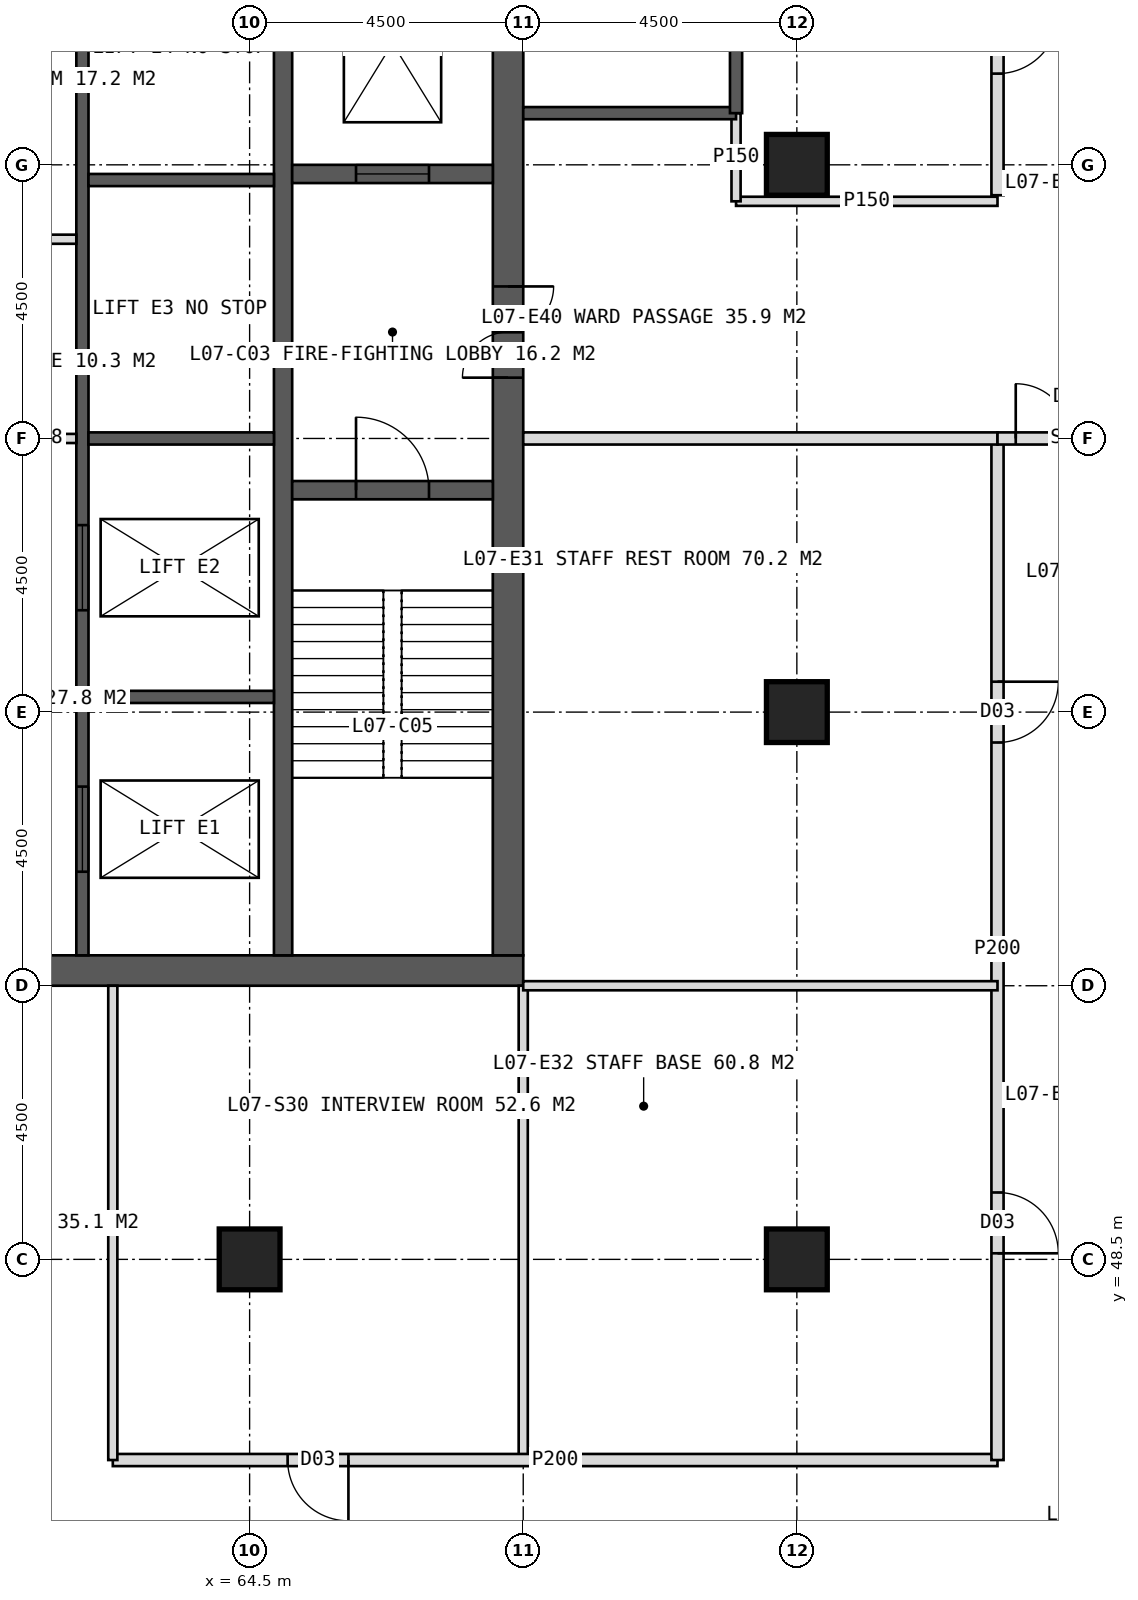
"""IFC4 building model, lengths in metres.
Left out: names, types, materials, properties, quantities, classifications, styles, units other than length and angle.
Written with IfcOpenShell. Run it as: python <this file> out.ifc"""

import sys

from ifc_helpers import new_model, si_unit, direction, frame, frame_2d, origin, origin_2d, place, context, subcontext, project, spatial, rectangle, hollow_rectangle, extrude, element, fill, save


model = new_model("IFC4")
c1 = context("Model", 3, precision=1e-05, world=origin(), true_north=direction((0.0, 1.0)))
c2 = subcontext(c1, "Body", "Model", "MODEL_VIEW")
j1 = project(units=[si_unit("LENGTHUNIT", "METRE"), si_unit("PLANEANGLEUNIT", "RADIAN")], contexts=[c1])
p1 = place(None, origin())
s1 = spatial("IfcSite", under=j1, at=p1, CompositionType="ELEMENT")
p2 = place(p1, origin())
s2 = spatial("IfcBuilding", under=s1, at=p2, CompositionType="ELEMENT")
p3 = place(p2, frame((0.0, 0.0, 35.0)))
s3 = spatial("IfcBuildingStorey", under=s2, at=p3, CompositionType="ELEMENT", Elevation=35.0)
p4 = place(p3, frame((51.0, 53.25, 0.0), z_axis=(0.0, 0.0, 1.0), x_axis=(1.0, 0.0, 0.0)))
e1 = element("IfcWall", 1, at=p4, inside=s3, PredefinedType="SHEAR", context=c2, shape_type="SweptSolid", body=[
    extrude(rectangle(XDim=18.0, YDim=0.5, at=frame_2d((9.0, 0.0))), origin(), (0.0, 0.0, 1.0), 4.0),
])
p5 = place(p4, frame((8.1, 0.0, 0.0)))
e2 = element("IfcOpeningElement", 2, at=p5, cuts=e1, PredefinedType="OPENING", context=c2, shape_type="SweptSolid", body=[
    extrude(rectangle(XDim=1.8, YDim=2.2, at=frame_2d((0.9, 1.1))), frame((0.0, 0.26, 0.0), z_axis=(0.0, -1.0, 0.0), x_axis=(1.0, 0.0, 0.0)), (0.0, 0.0, 1.0), 0.52),
])
p6 = place(p3, frame((68.75, 53.5, 0.0), z_axis=(0.0, 0.0, 1.0), x_axis=(0.0, 1.0, 0.0)))
e3 = element("IfcWall", 3, at=p6, inside=s3, PredefinedType="SHEAR", context=c2, shape_type="SweptSolid", body=[
    extrude(rectangle(XDim=17.0, YDim=0.5, at=frame_2d((8.5, 0.0))), origin(), (0.0, 0.0, 1.0), 4.0),
])
p7 = place(p6, frame((9.5, 0.0, 0.0)))
e4 = element("IfcOpeningElement", 4, at=p7, cuts=e3, PredefinedType="OPENING", context=c2, shape_type="SweptSolid", body=[
    extrude(rectangle(XDim=1.5, YDim=2.2, at=frame_2d((0.75, 1.1))), frame((0.0, 0.26, 0.0), z_axis=(0.0, -1.0, 0.0), x_axis=(1.0, 0.0, 0.0)), (0.0, 0.0, 1.0), 0.52),
])
p8 = place(p3, frame((65.05, 53.5, 0.0), z_axis=(0.0, 0.0, 1.0), x_axis=(0.0, 1.0, 0.0)))
e5 = element("IfcWall", 5, at=p8, inside=s3, PredefinedType="SHEAR", context=c2, shape_type="SweptSolid", body=[
    extrude(rectangle(XDim=17.0, YDim=0.3, at=frame_2d((8.5, 0.0))), origin(), (0.0, 0.0, 1.0), 4.0),
])
p9 = place(p3, frame((61.75, 53.5, 0.0), z_axis=(0.0, 0.0, 1.0), x_axis=(0.0, 1.0, 0.0)))
e6 = element("IfcWall", 6, at=p9, inside=s3, PredefinedType="SHEAR", context=c2, shape_type="SweptSolid", body=[
    extrude(rectangle(XDim=17.0, YDim=0.2, at=frame_2d((8.5, 0.0))), origin(), (0.0, 0.0, 1.0), 4.0),
])
p10 = place(p9, frame((1.375, 0.0, 0.0)))
e7 = element("IfcOpeningElement", 7, at=p10, cuts=e6, PredefinedType="OPENING", context=c2, shape_type="SweptSolid", body=[
    extrude(rectangle(XDim=1.4, YDim=2.2, at=frame_2d((0.7, 1.1))), frame((0.0, 0.11, 0.0), z_axis=(0.0, -1.0, 0.0), x_axis=(1.0, 0.0, 0.0)), (0.0, 0.0, 1.0), 0.22),
])
p11 = place(p9, frame((5.675, 0.0, 0.0)))
e8 = element("IfcOpeningElement", 8, at=p11, cuts=e6, PredefinedType="OPENING", context=c2, shape_type="SweptSolid", body=[
    extrude(rectangle(XDim=1.4, YDim=2.2, at=frame_2d((0.7, 1.1))), frame((0.0, 0.11, 0.0), z_axis=(0.0, -1.0, 0.0), x_axis=(1.0, 0.0, 0.0)), (0.0, 0.0, 1.0), 0.22),
])
for number, where, z_axis, x_axis in (
    (9, (61.85, 57.75, 0.0), (0.0, 0.0, 1.0), (1.0, 0.0, 0.0)),
    (10, (61.85, 62.0, 0.0), (0.0, 0.0, 1.0), (1.0, 0.0, 0.0)),
    (11, (61.85, 66.25, 0.0), (0.0, 0.0, 1.0), (1.0, 0.0, 0.0)),
):
    element("IfcWall", number, at=place(p3, frame(where, z_axis=z_axis, x_axis=x_axis)), inside=s3, PredefinedType="SHEAR", context=c2, shape_type="SweptSolid", body=[
        extrude(rectangle(XDim=3.05, YDim=0.2, at=frame_2d((1.525, 0.0))), origin(), (0.0, 0.0, 1.0), 4.0),
    ])
p12 = place(p3, frame((65.2, 61.15, 0.0), z_axis=(0.0, 0.0, 1.0), x_axis=(1.0, 0.0, 0.0)))
e12 = element("IfcWall", 12, at=p12, inside=s3, PredefinedType="SHEAR", context=c2, shape_type="SweptSolid", body=[
    extrude(rectangle(XDim=3.3, YDim=0.3, at=frame_2d((1.65, 0.0))), origin(), (0.0, 0.0, 1.0), 4.0),
])
p13 = place(p12, frame((1.05, 0.0, 0.0)))
e13 = element("IfcOpeningElement", 13, at=p13, cuts=e12, PredefinedType="OPENING", context=c2, shape_type="SweptSolid", body=[
    extrude(rectangle(XDim=1.2, YDim=2.1, at=frame_2d((0.6, 1.05))), frame((0.0, 0.16, 0.0), z_axis=(0.0, -1.0, 0.0), x_axis=(1.0, 0.0, 0.0)), (0.0, 0.0, 1.0), 0.32),
])
p14 = place(p3, frame((65.2, 66.35, 0.0), z_axis=(0.0, 0.0, 1.0), x_axis=(1.0, 0.0, 0.0)))
e14 = element("IfcWall", 14, at=p14, inside=s3, PredefinedType="SHEAR", context=c2, shape_type="SweptSolid", body=[
    extrude(rectangle(XDim=3.3, YDim=0.3, at=frame_2d((1.65, 0.0))), origin(), (0.0, 0.0, 1.0), 4.0),
])
p15 = place(p14, frame((1.05, 0.0, 0.0)))
e15 = element("IfcOpeningElement", 15, at=p15, cuts=e14, PredefinedType="OPENING", context=c2, shape_type="SweptSolid", body=[
    extrude(rectangle(XDim=1.2, YDim=2.2, at=frame_2d((0.6, 1.1))), frame((0.0, 0.16, 0.0), z_axis=(0.0, -1.0, 0.0), x_axis=(1.0, 0.0, 0.0)), (0.0, 0.0, 1.0), 0.32),
])
for number, where, z_axis, x_axis in (
    (16, (73.5, 48.5, 0.0), (0.0, 0.0, 1.0), (1.0, 0.0, 0.0)),
    (17, (64.5, 48.5, 0.0), (0.0, 0.0, 1.0), (1.0, 0.0, 0.0)),
    (18, (73.5, 57.5, 0.0), (0.0, 0.0, 1.0), (1.0, 0.0, 0.0)),
    (19, (73.5, 66.5, 0.0), (0.0, 0.0, 1.0), (1.0, 0.0, 0.0)),
):
    element("IfcColumn", number, at=place(p3, frame(where, z_axis=z_axis, x_axis=x_axis)), inside=s3, PredefinedType="COLUMN", context=c2, shape_type="SweptSolid", body=[
        extrude(hollow_rectangle(XDim=1.0, YDim=1.0, WallThickness=0.1, at=origin_2d()), origin(), (0.0, 0.0, 1.0), 4.0),
    ])
p16 = place(p3, frame((69.0, 53.0, 0.0), z_axis=(0.0, 0.0, 1.0), x_axis=(0.0, -1.0, 0.0)))
e20 = element("IfcWall", 20, at=p16, inside=s3, PredefinedType="PARTITIONING", context=c2, shape_type="SweptSolid", body=[
    extrude(rectangle(XDim=7.8, YDim=0.15, at=frame_2d((3.9, 0.0))), origin(), (0.0, 0.0, 1.0), 3.75),
])
p17 = place(p3, frame((76.8, 45.2, 0.0), z_axis=(0.0, 0.0, 1.0), x_axis=(-1.0, 0.0, 0.0)))
e21 = element("IfcWall", 21, at=p17, inside=s3, PredefinedType="PARTITIONING", context=c2, shape_type="SweptSolid", body=[
    extrude(rectangle(XDim=14.55, YDim=0.2, at=frame_2d((7.275, 0.0))), origin(), (0.0, 0.0, 1.0), 3.75),
])
p18 = place(p17, frame((10.675, 0.0, 0.0)))
e22 = element("IfcOpeningElement", 22, at=p18, cuts=e21, PredefinedType="OPENING", context=c2, shape_type="SweptSolid", body=[
    extrude(rectangle(XDim=1.0, YDim=2.1, at=frame_2d((0.5, 1.05))), frame((0.0, 0.11, 0.0), z_axis=(0.0, -1.0, 0.0), x_axis=(1.0, 0.0, 0.0)), (0.0, 0.0, 1.0), 0.22),
])
p19 = place(p3, frame((62.25, 53.0, 0.0), z_axis=(0.0, 0.0, 1.0), x_axis=(0.0, -1.0, 0.0)))
e23 = element("IfcWall", 23, at=p19, inside=s3, PredefinedType="PARTITIONING", context=c2, shape_type="SweptSolid", body=[
    extrude(rectangle(XDim=7.8, YDim=0.15, at=frame_2d((3.9, 0.0))), origin(), (0.0, 0.0, 1.0), 3.75),
])
p20 = place(p3, frame((76.8, 78.8, 0.0), z_axis=(0.0, 0.0, 1.0), x_axis=(0.0, -1.0, 0.0)))
e24 = element("IfcWall", 24, at=p20, inside=s3, PredefinedType="PARTITIONING", context=c2, shape_type="SweptSolid", body=[
    extrude(rectangle(XDim=12.8, YDim=0.2, at=frame_2d((6.4, 0.0))), origin(), (0.0, 0.0, 1.0), 3.75),
])
p21 = place(p20, frame((9.8, 0.0, 0.0)))
e25 = element("IfcOpeningElement", 25, at=p21, cuts=e24, PredefinedType="OPENING", context=c2, shape_type="SweptSolid", body=[
    extrude(rectangle(XDim=1.0, YDim=2.1, at=frame_2d((0.5, 1.05))), frame((0.0, 0.11, 0.0), z_axis=(0.0, -1.0, 0.0), x_axis=(1.0, 0.0, 0.0)), (0.0, 0.0, 1.0), 0.22),
])
p22 = place(p3, frame((76.8, 62.0, 0.0), z_axis=(0.0, 0.0, 1.0), x_axis=(0.0, -1.0, 0.0)))
e26 = element("IfcWall", 26, at=p22, inside=s3, PredefinedType="PARTITIONING", context=c2, shape_type="SweptSolid", body=[
    extrude(rectangle(XDim=16.8, YDim=0.2, at=frame_2d((8.4, 0.0))), origin(), (0.0, 0.0, 1.0), 3.75),
])
p23 = place(p22, frame((4.0, 0.0, 0.0)))
e27 = element("IfcOpeningElement", 27, at=p23, cuts=e26, PredefinedType="OPENING", context=c2, shape_type="SweptSolid", body=[
    extrude(rectangle(XDim=1.0, YDim=2.1, at=frame_2d((0.5, 1.05))), frame((0.0, 0.11, 0.0), z_axis=(0.0, -1.0, 0.0), x_axis=(1.0, 0.0, 0.0)), (0.0, 0.0, 1.0), 0.22),
])
p24 = place(p22, frame((12.4, 0.0, 0.0)))
e28 = element("IfcOpeningElement", 28, at=p24, cuts=e26, PredefinedType="OPENING", context=c2, shape_type="SweptSolid", body=[
    extrude(rectangle(XDim=1.0, YDim=2.1, at=frame_2d((0.5, 1.05))), frame((0.0, 0.11, 0.0), z_axis=(0.0, -1.0, 0.0), x_axis=(1.0, 0.0, 0.0)), (0.0, 0.0, 1.0), 0.22),
])
p25 = place(p3, frame((72.5, 65.9, 0.0), z_axis=(0.0, 0.0, 1.0), x_axis=(1.0, 0.0, 0.0)))
e29 = element("IfcWall", 29, at=p25, inside=s3, PredefinedType="PARTITIONING", context=c2, shape_type="SweptSolid", body=[
    extrude(rectangle(XDim=4.3, YDim=0.15, at=frame_2d((2.15, 0.0))), origin(), (0.0, 0.0, 1.0), 3.75),
])
p26 = place(p3, frame((69.0, 62.0, 0.0), z_axis=(0.0, 0.0, 1.0), x_axis=(1.0, 0.0, 0.0)))
e30 = element("IfcWall", 30, at=p26, inside=s3, PredefinedType="SOLIDWALL", context=c2, shape_type="SweptSolid", body=[
    extrude(rectangle(XDim=7.8, YDim=0.2, at=frame_2d((3.9, 0.0))), origin(), (0.0, 0.0, 1.0), 2.75),
])
p27 = place(p3, frame((69.0, 53.0, 0.0), z_axis=(0.0, 0.0, 1.0), x_axis=(1.0, 0.0, 0.0)))
e31 = element("IfcWall", 31, at=p27, inside=s3, PredefinedType="PARTITIONING", context=c2, shape_type="SweptSolid", body=[
    extrude(rectangle(XDim=7.8, YDim=0.15, at=frame_2d((3.9, 0.0))), origin(), (0.0, 0.0, 1.0), 3.75),
])
p28 = place(p3, frame((76.8, 62.0, 0.0), z_axis=(0.0, 0.0, 1.0), x_axis=(1.0, 0.0, 0.0)))
e32 = element("IfcWall", 32, at=p28, inside=s3, PredefinedType="SOLIDWALL", context=c2, shape_type="SweptSolid", body=[
    extrude(rectangle(XDim=2.7, YDim=0.2, at=frame_2d((1.35, 0.0))), origin(), (0.0, 0.0, 1.0), 2.75),
])
p29 = place(p28, frame((0.3, 0.0, 0.0)))
e33 = element("IfcOpeningElement", 33, at=p29, cuts=e32, PredefinedType="OPENING", context=c2, shape_type="SweptSolid", body=[
    extrude(rectangle(XDim=1.8, YDim=2.2, at=frame_2d((0.9, 1.1))), frame((0.0, 0.11, 0.0), z_axis=(0.0, -1.0, 0.0), x_axis=(1.0, 0.0, 0.0)), (0.0, 0.0, 1.0), 0.22),
])
p30 = place(p3, frame((58.35, 62.0, 0.0), z_axis=(0.0, 0.0, 1.0), x_axis=(1.0, 0.0, 0.0)))
e34 = element("IfcWall", 34, at=p30, inside=s3, PredefinedType="PARTITIONING", context=c2, shape_type="SweptSolid", body=[
    extrude(rectangle(XDim=3.3, YDim=0.15, at=frame_2d((1.65, 0.0))), origin(), (0.0, 0.0, 1.0), 3.75),
])
p31 = place(p30, frame((1.15, 0.0, 0.0)))
e35 = element("IfcOpeningElement", 35, at=p31, cuts=e34, PredefinedType="OPENING", context=c2, shape_type="SweptSolid", body=[
    extrude(rectangle(XDim=1.0, YDim=2.1, at=frame_2d((0.5, 1.05))), frame((0.0, 0.085, 0.0), z_axis=(0.0, -1.0, 0.0), x_axis=(1.0, 0.0, 0.0)), (0.0, 0.0, 1.0), 0.17),
])
p32 = place(p3, frame((58.35, 65.277, 0.0), z_axis=(0.0, 0.0, 1.0), x_axis=(1.0, 0.0, 0.0)))
e36 = element("IfcWall", 36, at=p32, inside=s3, PredefinedType="PARTITIONING", context=c2, shape_type="SweptSolid", body=[
    extrude(rectangle(XDim=3.3, YDim=0.15, at=frame_2d((1.65, 0.0))), origin(), (0.0, 0.0, 1.0), 3.75),
])
p33 = place(p3, frame((72.5, 65.9, 0.0), z_axis=(0.0, 0.0, 1.0), x_axis=(0.0, 1.0, 0.0)))
e37 = element("IfcWall", 37, at=p33, inside=s3, PredefinedType="PARTITIONING", context=c2, shape_type="SweptSolid", body=[
    extrude(rectangle(XDim=1.45, YDim=0.15, at=frame_2d((0.725, 0.0))), origin(), (0.0, 0.0, 1.0), 3.75),
])
p34 = place(p3, frame((69.0, 67.35, 0.0), z_axis=(0.0, 0.0, 1.0), x_axis=(1.0, 0.0, 0.0)))
e38 = element("IfcWall", 38, at=p34, inside=s3, PredefinedType="SOLIDWALL", context=c2, shape_type="SweptSolid", body=[
    extrude(rectangle(XDim=3.5, YDim=0.2, at=frame_2d((1.75, 0.0))), origin(), (0.0, 0.0, 1.0), 3.75),
])
p35 = place(p3, frame((72.5, 67.35, 0.0), z_axis=(0.0, 0.0, 1.0), x_axis=(0.0, 1.0, 0.0)))
e39 = element("IfcWall", 39, at=p35, inside=s3, PredefinedType="SOLIDWALL", context=c2, shape_type="SweptSolid", body=[
    extrude(rectangle(XDim=7.75, YDim=0.2, at=frame_2d((3.875, 0.0))), origin(), (0.0, 0.0, 1.0), 3.75),
])
p36 = place(p18, origin())
e40 = element("IfcDoor", 40, at=p36, inside=s3, OperationType="SINGLE_SWING_LEFT", PredefinedType="DOOR", context=c2, shape_type="SweptSolid", body=[
    extrude(rectangle(XDim=1.0, YDim=2.1, at=frame_2d((0.5, 1.05))), frame((0.0, 0.025, 0.0), z_axis=(0.0, -1.0, 0.0), x_axis=(1.0, 0.0, 0.0)), (0.0, 0.0, 1.0), 0.05),
])
fill(e22, e40)
p37 = place(p21, origin())
e41 = element("IfcDoor", 41, at=p37, inside=s3, OperationType="SINGLE_SWING_LEFT", PredefinedType="DOOR", context=c2, shape_type="SweptSolid", body=[
    extrude(rectangle(XDim=1.0, YDim=2.1, at=frame_2d((0.5, 1.05))), frame((0.0, 0.025, 0.0), z_axis=(0.0, -1.0, 0.0), x_axis=(1.0, 0.0, 0.0)), (0.0, 0.0, 1.0), 0.05),
])
fill(e25, e41)
p38 = place(p23, origin())
e42 = element("IfcDoor", 42, at=p38, inside=s3, OperationType="SINGLE_SWING_LEFT", PredefinedType="DOOR", context=c2, shape_type="SweptSolid", body=[
    extrude(rectangle(XDim=1.0, YDim=2.1, at=frame_2d((0.5, 1.05))), frame((0.0, 0.025, 0.0), z_axis=(0.0, -1.0, 0.0), x_axis=(1.0, 0.0, 0.0)), (0.0, 0.0, 1.0), 0.05),
])
fill(e27, e42)
p39 = place(p24, origin())
e43 = element("IfcDoor", 43, at=p39, inside=s3, OperationType="SINGLE_SWING_RIGHT", PredefinedType="DOOR", context=c2, shape_type="SweptSolid", body=[
    extrude(rectangle(XDim=1.0, YDim=2.1, at=frame_2d((0.5, 1.05))), frame((0.0, 0.025, 0.0), z_axis=(0.0, -1.0, 0.0), x_axis=(1.0, 0.0, 0.0)), (0.0, 0.0, 1.0), 0.05),
])
fill(e28, e43)
p40 = place(p29, origin())
e44 = element("IfcDoor", 44, at=p40, inside=s3, OperationType="DOUBLE_DOOR_DOUBLE_SWING", PredefinedType="DOOR", context=c2, shape_type="SweptSolid", body=[
    extrude(rectangle(XDim=1.8, YDim=2.2, at=frame_2d((0.9, 1.1))), frame((0.0, 0.025, 0.0), z_axis=(0.0, -1.0, 0.0), x_axis=(1.0, 0.0, 0.0)), (0.0, 0.0, 1.0), 0.05),
])
fill(e33, e44)
p41 = place(p7, origin())
e45 = element("IfcDoor", 45, at=p41, inside=s3, OperationType="DOUBLE_DOOR_SINGLE_SWING", PredefinedType="DOOR", context=c2, shape_type="SweptSolid", body=[
    extrude(rectangle(XDim=1.5, YDim=2.2, at=frame_2d((0.75, 1.1))), frame((0.0, 0.025, 0.0), z_axis=(0.0, -1.0, 0.0), x_axis=(1.0, 0.0, 0.0)), (0.0, 0.0, 1.0), 0.05),
])
fill(e4, e45)
p42 = place(p13, origin())
e46 = element("IfcDoor", 46, at=p42, inside=s3, OperationType="SINGLE_SWING_LEFT", PredefinedType="DOOR", context=c2, shape_type="SweptSolid", body=[
    extrude(rectangle(XDim=1.2, YDim=2.1, at=frame_2d((0.6, 1.05))), frame((0.0, 0.025, 0.0), z_axis=(0.0, -1.0, 0.0), x_axis=(1.0, 0.0, 0.0)), (0.0, 0.0, 1.0), 0.05),
])
fill(e13, e46)
p43 = place(p15, origin())
e47 = element("IfcDoor", 47, at=p43, inside=s3, OperationType="SLIDING_TO_LEFT", PredefinedType="DOOR", context=c2, shape_type="SweptSolid", body=[
    extrude(rectangle(XDim=1.2, YDim=2.2, at=frame_2d((0.6, 1.1))), frame((0.0, 0.025, 0.0), z_axis=(0.0, -1.0, 0.0), x_axis=(1.0, 0.0, 0.0)), (0.0, 0.0, 1.0), 0.05),
])
fill(e15, e47)
p44 = place(p10, origin())
e48 = element("IfcDoor", 48, at=p44, inside=s3, OperationType="SLIDING_TO_LEFT", PredefinedType="DOOR", context=c2, shape_type="SweptSolid", body=[
    extrude(rectangle(XDim=1.4, YDim=2.2, at=frame_2d((0.7, 1.1))), frame((0.0, 0.025, 0.0), z_axis=(0.0, -1.0, 0.0), x_axis=(1.0, 0.0, 0.0)), (0.0, 0.0, 1.0), 0.05),
])
fill(e7, e48)
p45 = place(p11, origin())
e49 = element("IfcDoor", 49, at=p45, inside=s3, OperationType="SLIDING_TO_LEFT", PredefinedType="DOOR", context=c2, shape_type="SweptSolid", body=[
    extrude(rectangle(XDim=1.4, YDim=2.2, at=frame_2d((0.7, 1.1))), frame((0.0, 0.025, 0.0), z_axis=(0.0, -1.0, 0.0), x_axis=(1.0, 0.0, 0.0)), (0.0, 0.0, 1.0), 0.05),
])
fill(e8, e49)
save(model, sys.argv[1])
